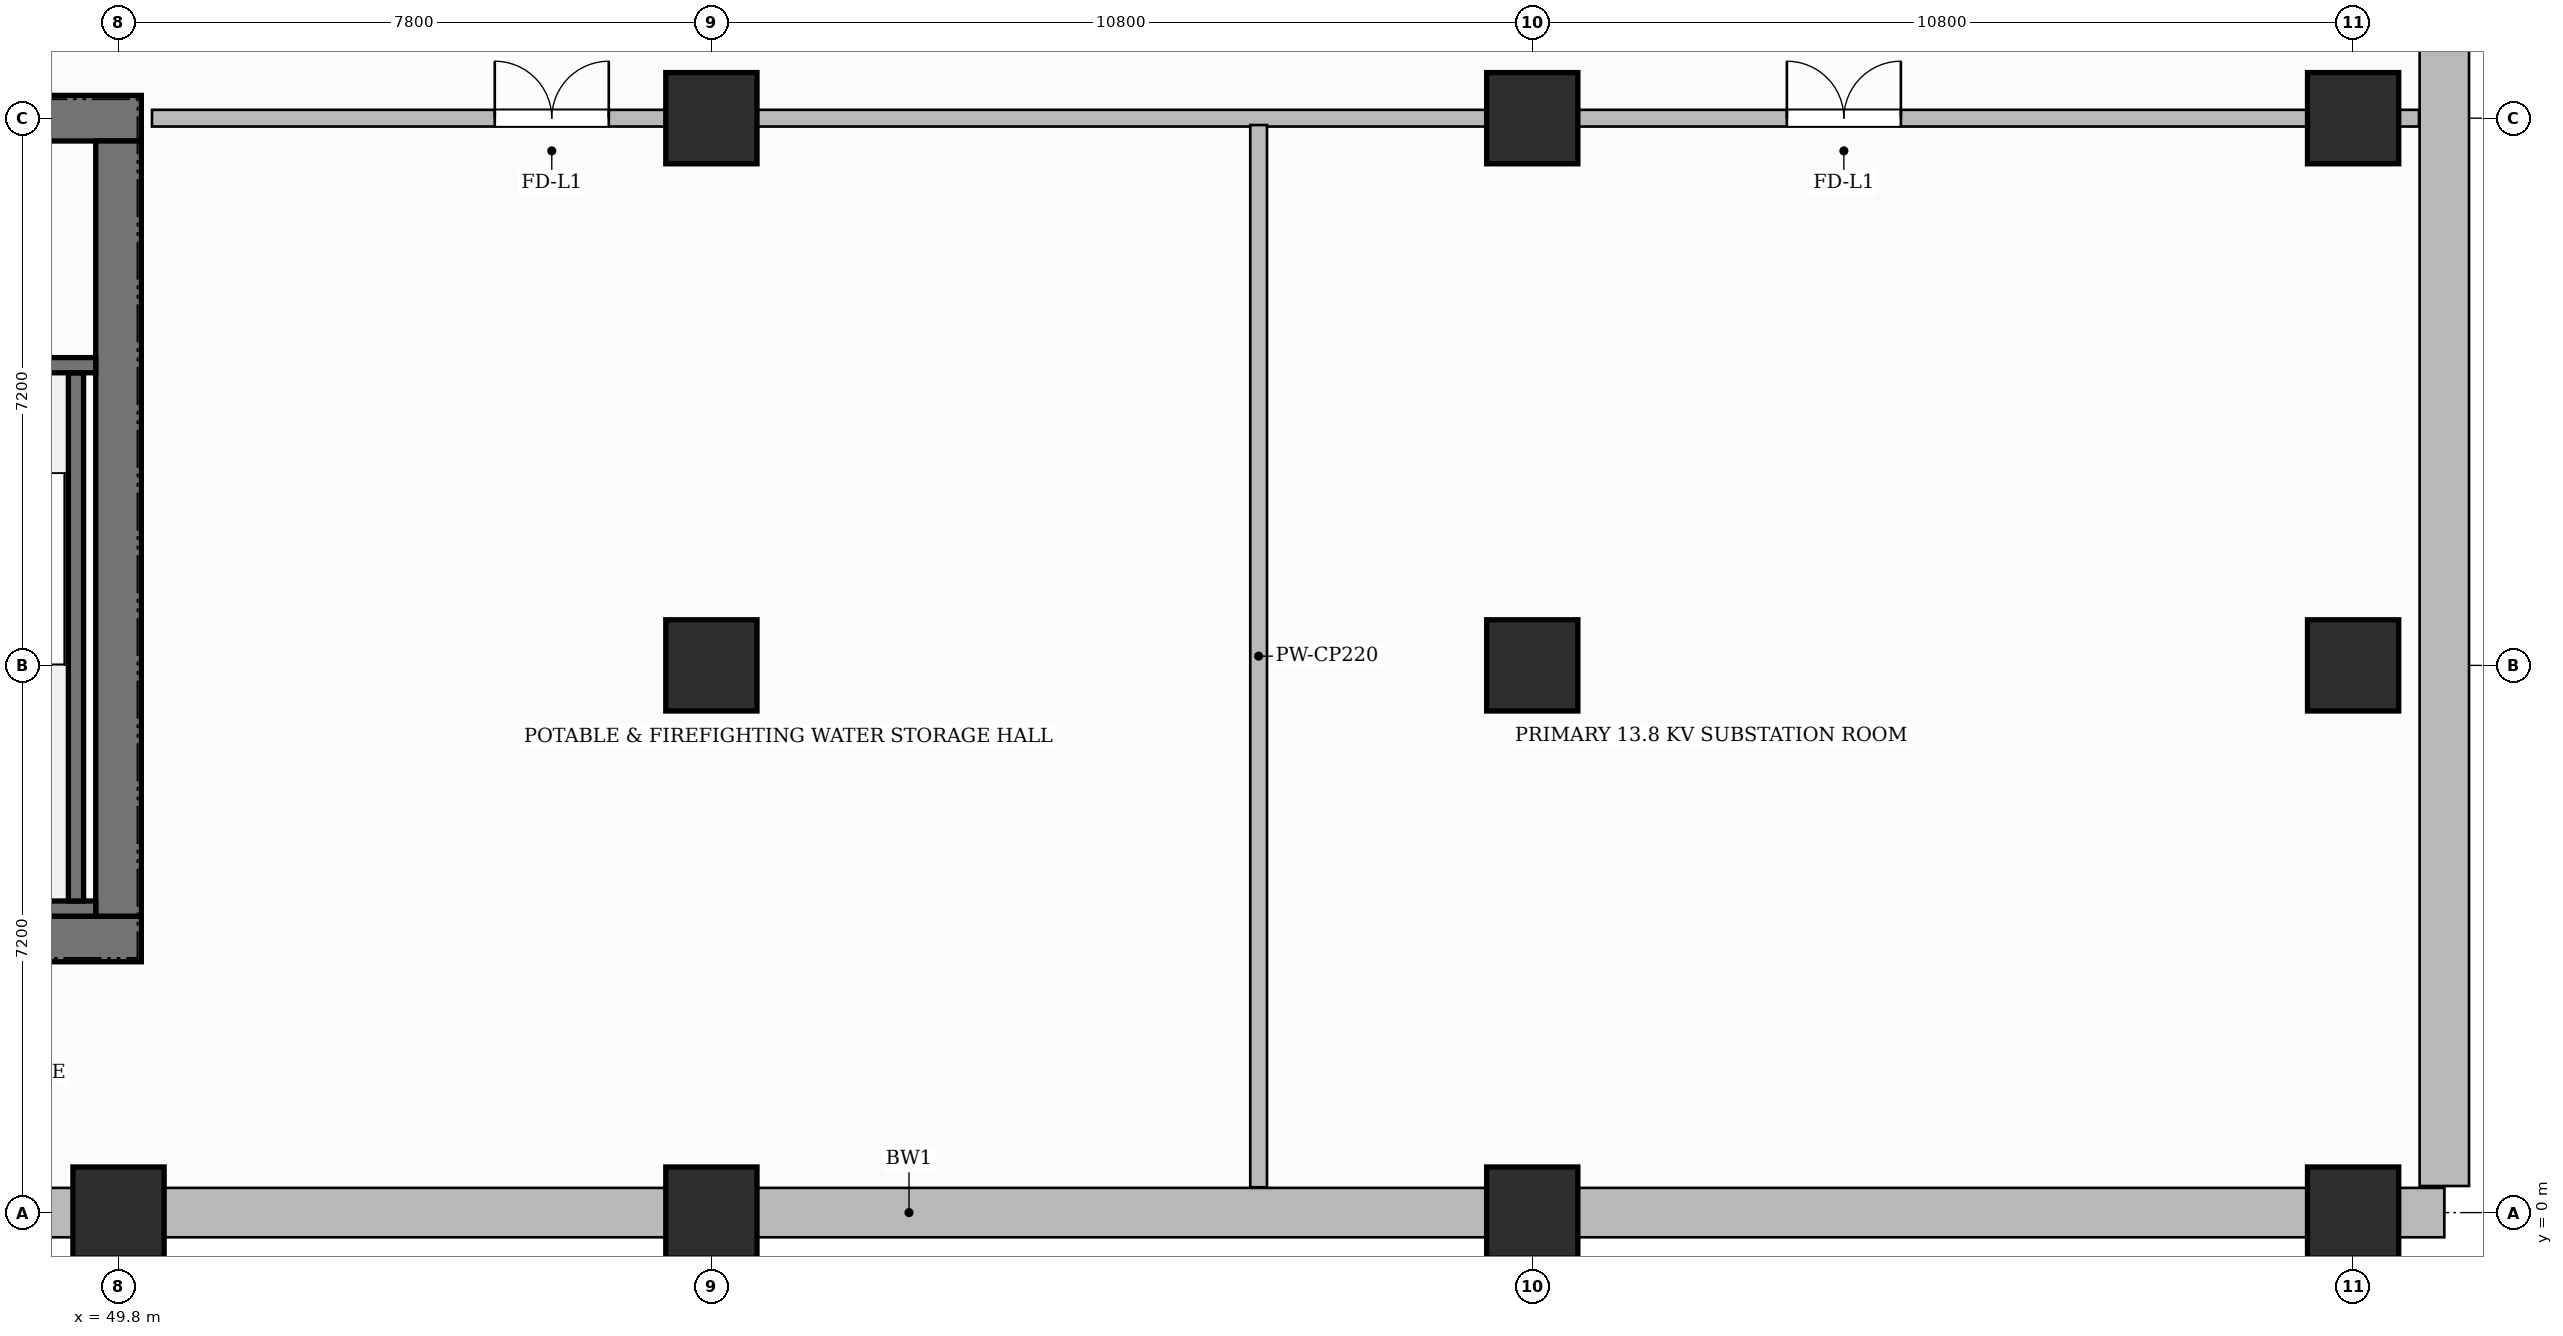
"""IFC4 building model, lengths in metres.
Left out: names, types, materials, properties, quantities, classifications, styles, units other than length and angle.
Written with IfcOpenShell. Run it as: python <this file> out.ifc"""

import sys

from ifc_helpers import new_model, si_unit, direction, frame, frame_2d, origin, origin_2d, place, context, subcontext, project, spatial, rectangle, extrude, source, transform, mapped, element, fill, save


model = new_model("IFC4")
c1 = context("Model", 3, precision=1e-05, world=origin(), true_north=direction((0.0, 1.0)))
c2 = subcontext(c1, "Body", "Model", "MODEL_VIEW")
j1 = project(units=[si_unit("LENGTHUNIT", "METRE"), si_unit("PLANEANGLEUNIT", "RADIAN")], contexts=[c1])
p1 = place(None, origin())
s1 = spatial("IfcSite", under=j1, at=p1, CompositionType="ELEMENT")
p2 = place(p1, origin())
s2 = spatial("IfcBuilding", under=s1, at=p2, CompositionType="ELEMENT")
p3 = place(p2, frame((0.0, 0.0, -13.0)))
s3 = spatial("IfcBuildingStorey", under=s2, at=p3, CompositionType="ELEMENT", Elevation=-13.0)
p4 = place(p3, frame((-4.8, 0.0, -0.4), z_axis=(0.0, 0.0, 1.0), x_axis=(1.0, 0.0, 0.0)))
e1 = element("IfcWall", 1, at=p4, inside=s3, PredefinedType="USERDEFINED", context=c2, shape_type="SweptSolid", body=[
    extrude(rectangle(XDim=85.2, YDim=0.65, at=frame_2d((42.6, 0.0))), origin(), (0.0, 0.0, 1.0), 6.9),
])
p5 = place(p3, frame((80.4, 0.35, -0.4), z_axis=(0.0, 0.0, 1.0), x_axis=(0.0, 1.0, 0.0)))
e2 = element("IfcWall", 2, at=p5, inside=s3, PredefinedType="USERDEFINED", context=c2, shape_type="SweptSolid", body=[
    extrude(rectangle(XDim=46.1, YDim=0.65, at=frame_2d((23.05, 0.0))), origin(), (0.0, 0.0, 1.0), 6.9),
])
p6 = place(p3, frame((34.5, 3.6, -0.4), z_axis=(0.0, 0.0, 1.0), x_axis=(1.0, 0.0, 0.0)))
e3 = element("IfcWall", 3, at=p6, inside=s3, PredefinedType="SHEAR", context=c2, shape_type="SweptSolid", body=[
    extrude(rectangle(XDim=15.6, YDim=0.6, at=frame_2d((7.8, 0.0))), origin(), (0.0, 0.0, 1.0), 6.9),
])
p7 = place(p6, frame((4.5, 0.0, 0.4)))
e4 = element("IfcOpeningElement", 4, at=p7, cuts=e3, PredefinedType="OPENING", context=c2, shape_type="SweptSolid", body=[
    extrude(rectangle(XDim=0.9, YDim=2.1, at=frame_2d((0.45, 1.05))), frame((0.0, 0.31, 0.0), z_axis=(0.0, -1.0, 0.0), x_axis=(1.0, 0.0, 0.0)), (0.0, 0.0, 1.0), 0.62),
])
p8 = place(p6, frame((6.95, 0.0, 0.4)))
e5 = element("IfcOpeningElement", 5, at=p8, cuts=e3, PredefinedType="OPENING", context=c2, shape_type="SweptSolid", body=[
    extrude(rectangle(XDim=0.9, YDim=2.1, at=frame_2d((0.45, 1.05))), frame((0.0, 0.31, 0.0), z_axis=(0.0, -1.0, 0.0), x_axis=(1.0, 0.0, 0.0)), (0.0, 0.0, 1.0), 0.62),
])
p9 = place(p3, frame((34.5, 14.4, -0.4), z_axis=(0.0, 0.0, 1.0), x_axis=(1.0, 0.0, 0.0)))
e6 = element("IfcWall", 6, at=p9, inside=s3, PredefinedType="SHEAR", context=c2, shape_type="SweptSolid", body=[
    extrude(rectangle(XDim=15.6, YDim=0.6, at=frame_2d((7.8, 0.0))), origin(), (0.0, 0.0, 1.0), 6.9),
])
p10 = place(p9, frame((5.43, 0.0, 0.4)))
e7 = element("IfcOpeningElement", 7, at=p10, cuts=e6, PredefinedType="OPENING", context=c2, shape_type="SweptSolid", body=[
    extrude(rectangle(XDim=1.5, YDim=2.2, at=frame_2d((0.75, 1.1))), frame((0.0, 0.31, 0.0), z_axis=(0.0, -1.0, 0.0), x_axis=(1.0, 0.0, 0.0)), (0.0, 0.0, 1.0), 0.62),
])
p11 = place(p9, frame((1.645, 0.0, 0.4)))
e8 = element("IfcOpeningElement", 8, at=p11, cuts=e6, PredefinedType="OPENING", context=c2, shape_type="SweptSolid", body=[
    extrude(rectangle(XDim=1.05, YDim=2.15, at=frame_2d((0.525, 1.075))), frame((0.0, 0.31, 0.0), z_axis=(0.0, -1.0, 0.0), x_axis=(1.0, 0.0, 0.0)), (0.0, 0.0, 1.0), 0.62),
])
p12 = place(p9, frame((11.275, 0.0, 0.4)))
e9 = element("IfcOpeningElement", 9, at=p12, cuts=e6, PredefinedType="OPENING", context=c2, shape_type="SweptSolid", body=[
    extrude(rectangle(XDim=1.05, YDim=2.15, at=frame_2d((0.525, 1.075))), frame((0.0, 0.31, 0.0), z_axis=(0.0, -1.0, 0.0), x_axis=(1.0, 0.0, 0.0)), (0.0, 0.0, 1.0), 0.62),
])
p13 = place(p3, frame((49.8, 3.9, -0.4), z_axis=(0.0, 0.0, 1.0), x_axis=(0.0, 1.0, 0.0)))
e10 = element("IfcWall", 10, at=p13, inside=s3, PredefinedType="SHEAR", context=c2, shape_type="SweptSolid", body=[
    extrude(rectangle(XDim=10.2, YDim=0.6, at=frame_2d((5.1, 0.0))), origin(), (0.0, 0.0, 1.0), 6.9),
])
m1 = source(origin(), c2, "Body", "SweptSolid", [
    extrude(rectangle(XDim=1.2, YDim=1.2, at=origin_2d()), origin(), (0.0, 0.0, 1.0), 6.9),
])
for number, where, z_axis, x_axis in (
    (11, (49.8, 0.0, -0.4), (0.0, 0.0, 1.0), (1.0, 0.0, 0.0)),
    (12, (57.6, 0.0, -0.4), (0.0, 0.0, 1.0), (1.0, 0.0, 0.0)),
    (13, (57.6, 7.2, -0.4), (0.0, 0.0, 1.0), (1.0, 0.0, 0.0)),
    (14, (57.6, 14.4, -0.4), (0.0, 0.0, 1.0), (1.0, 0.0, 0.0)),
    (15, (68.4, 0.0, -0.4), (0.0, 0.0, 1.0), (1.0, 0.0, 0.0)),
    (16, (68.4, 7.2, -0.4), (0.0, 0.0, 1.0), (1.0, 0.0, 0.0)),
    (17, (68.4, 14.4, -0.4), (0.0, 0.0, 1.0), (1.0, 0.0, 0.0)),
    (18, (79.2, 0.0, -0.4), (0.0, 0.0, 1.0), (1.0, 0.0, 0.0)),
    (19, (79.2, 7.2, -0.4), (0.0, 0.0, 1.0), (1.0, 0.0, 0.0)),
    (20, (79.2, 14.4, -0.4), (0.0, 0.0, 1.0), (1.0, 0.0, 0.0)),
):
    element("IfcColumn", number, at=place(p3, frame(where, z_axis=z_axis, x_axis=x_axis)), inside=s3, PredefinedType="COLUMN", context=c2, shape_type="MappedRepresentation", body=[
        mapped(m1, transform((0.0, 0.0, 0.0), scale=1.0)),
    ])
p14 = place(p3, frame((43.12, 4.0, -0.4), z_axis=(0.0, 0.0, 1.0), x_axis=(1.0, 0.0, 0.0)))
e21 = element("IfcWall", 21, at=p14, inside=s3, PredefinedType="SHEAR", context=c2, shape_type="SweptSolid", body=[
    extrude(rectangle(XDim=6.38, YDim=0.2, at=frame_2d((3.19, 0.0))), origin(), (0.0, 0.0, 1.0), 6.9),
])
p15 = place(p3, frame((49.24, 4.1, -0.4), z_axis=(0.0, 0.0, 1.0), x_axis=(0.0, 1.0, 0.0)))
e22 = element("IfcWall", 22, at=p15, inside=s3, PredefinedType="SHEAR", context=c2, shape_type="SweptSolid", body=[
    extrude(rectangle(XDim=6.95, YDim=0.2, at=frame_2d((3.475, 0.0))), origin(), (0.0, 0.0, 1.0), 6.9),
])
p16 = place(p3, frame((43.12, 11.15, -0.4), z_axis=(0.0, 0.0, 1.0), x_axis=(1.0, 0.0, 0.0)))
e23 = element("IfcWall", 23, at=p16, inside=s3, PredefinedType="SHEAR", context=c2, shape_type="SweptSolid", body=[
    extrude(rectangle(XDim=6.38, YDim=0.2, at=frame_2d((3.19, 0.0))), origin(), (0.0, 0.0, 1.0), 6.9),
])
p17 = place(p16, frame((1.045, 0.0, 0.4)))
e24 = element("IfcOpeningElement", 24, at=p17, cuts=e23, PredefinedType="OPENING", context=c2, shape_type="SweptSolid", body=[
    extrude(rectangle(XDim=1.05, YDim=2.2, at=frame_2d((0.525, 1.1))), frame((0.0, 0.11, 0.0), z_axis=(0.0, -1.0, 0.0), x_axis=(1.0, 0.0, 0.0)), (0.0, 0.0, 1.0), 0.22),
])
p18 = place(p16, frame((4.125, 0.0, 0.4)))
e25 = element("IfcOpeningElement", 25, at=p18, cuts=e23, PredefinedType="OPENING", context=c2, shape_type="SweptSolid", body=[
    extrude(rectangle(XDim=1.05, YDim=2.2, at=frame_2d((0.525, 1.1))), frame((0.0, 0.11, 0.0), z_axis=(0.0, -1.0, 0.0), x_axis=(1.0, 0.0, 0.0)), (0.0, 0.0, 1.0), 0.22),
])
p19 = place(p3, frame((50.24, 14.4, 0.0), z_axis=(0.0, 0.0, 1.0), x_axis=(1.0, 0.0, 0.0)))
e26 = element("IfcWall", 26, at=p19, inside=s3, PredefinedType="PARTITIONING", context=c2, shape_type="SweptSolid", body=[
    extrude(rectangle(XDim=29.827, YDim=0.22, at=frame_2d((14.914, 0.0))), origin(), (0.0, 0.0, 1.0), 5.185),
])
p20 = place(p19, frame((4.51, 0.0, 0.0)))
e27 = element("IfcOpeningElement", 27, at=p20, cuts=e26, PredefinedType="OPENING", context=c2, shape_type="SweptSolid", body=[
    extrude(rectangle(XDim=1.5, YDim=2.2, at=frame_2d((0.75, 1.1))), frame((0.0, 0.12, 0.0), z_axis=(0.0, -1.0, 0.0), x_axis=(1.0, 0.0, 0.0)), (0.0, 0.0, 1.0), 0.24),
])
p21 = place(p19, frame((21.51, 0.0, 0.0)))
e28 = element("IfcOpeningElement", 28, at=p21, cuts=e26, PredefinedType="OPENING", context=c2, shape_type="SweptSolid", body=[
    extrude(rectangle(XDim=1.5, YDim=2.2, at=frame_2d((0.75, 1.1))), frame((0.0, 0.12, 0.0), z_axis=(0.0, -1.0, 0.0), x_axis=(1.0, 0.0, 0.0)), (0.0, 0.0, 1.0), 0.24),
])
p22 = place(p3, frame((64.8, 0.333, 0.0), z_axis=(0.0, 0.0, 1.0), x_axis=(0.0, 1.0, 0.0)))
e29 = element("IfcWall", 29, at=p22, inside=s3, PredefinedType="PARTITIONING", context=c2, shape_type="SweptSolid", body=[
    extrude(rectangle(XDim=13.977, YDim=0.22, at=frame_2d((6.989, 0.0))), origin(), (0.0, 0.0, 1.0), 6.1),
])
m2 = source(origin(), c2, "Body", "SweptSolid", [
    extrude(rectangle(XDim=1.5, YDim=2.2, at=frame_2d((0.75, 1.1))), frame((0.0, 0.025, 0.0), z_axis=(0.0, -1.0, 0.0), x_axis=(1.0, 0.0, 0.0)), (0.0, 0.0, 1.0), 0.05),
])
p23 = place(p20, origin())
e30 = element("IfcDoor", 30, at=p23, inside=s3, OperationType="DOUBLE_DOOR_SINGLE_SWING", PredefinedType="DOOR", context=c2, shape_type="MappedRepresentation", body=[
    mapped(m2, transform((0.0, 0.0, 0.0), scale=1.0)),
])
fill(e27, e30)
p24 = place(p21, origin())
e31 = element("IfcDoor", 31, at=p24, inside=s3, OperationType="DOUBLE_DOOR_SINGLE_SWING", PredefinedType="DOOR", context=c2, shape_type="MappedRepresentation", body=[
    mapped(m2, transform((0.0, 0.0, 0.0), scale=1.0)),
])
fill(e28, e31)
save(model, sys.argv[1])
